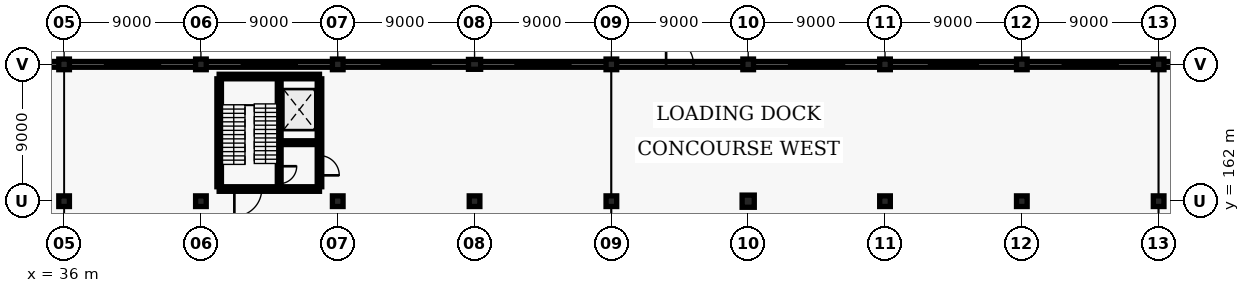
"""IFC4 building model, lengths in metres.
Left out: names, types, materials, properties, quantities, classifications, styles, units other than length and angle.
Written with IfcOpenShell. Run it as: python <this file> out.ifc"""

import sys

from ifc_helpers import new_model, si_unit, direction, frame, frame_2d, origin, origin_2d, place, context, subcontext, project, spatial, rectangle, circle, extrude, element, fill, save


model = new_model("IFC4")
c1 = context("Model", 3, precision=1e-05, world=origin(), true_north=direction((0.0, 1.0)))
c2 = subcontext(c1, "Body", "Model", "MODEL_VIEW")
j1 = project(units=[si_unit("LENGTHUNIT", "METRE"), si_unit("PLANEANGLEUNIT", "RADIAN")], contexts=[c1])
p1 = place(None, origin())
s1 = spatial("IfcSite", under=j1, at=p1, CompositionType="ELEMENT")
p2 = place(p1, origin())
s2 = spatial("IfcBuilding", under=s1, at=p2, CompositionType="ELEMENT")
p3 = place(p2, origin())
s3 = spatial("IfcBuildingStorey", under=s2, at=p3, CompositionType="ELEMENT", Elevation=0.0)
for number, where, z_axis, x_axis in (
    (1, (36.0, 162.0, 0.0), (0.0, 0.0, 1.0), (1.0, 0.0, 0.0)),
    (2, (36.0, 171.0, 0.0), (0.0, 0.0, 1.0), (1.0, 0.0, 0.0)),
    (3, (45.0, 162.0, 0.0), (0.0, 0.0, 1.0), (1.0, 0.0, 0.0)),
    (4, (45.0, 171.0, 0.0), (0.0, 0.0, 1.0), (1.0, 0.0, 0.0)),
    (5, (54.0, 162.0, 0.0), (0.0, 0.0, 1.0), (1.0, 0.0, 0.0)),
    (6, (54.0, 171.0, 0.0), (0.0, 0.0, 1.0), (1.0, 0.0, 0.0)),
    (7, (63.0, 162.0, 0.0), (0.0, 0.0, 1.0), (1.0, 0.0, 0.0)),
):
    element("IfcColumn", number, at=place(p3, frame(where, z_axis=z_axis, x_axis=x_axis)), inside=s3, PredefinedType="COLUMN", context=c2, shape_type="SweptSolid", body=[
        extrude(rectangle(XDim=0.7, YDim=0.7, at=origin_2d()), origin(), (0.0, 0.0, 1.0), 5.4),
    ])
p4 = place(p3, frame((63.0, 171.0, 0.0), z_axis=(0.0, 0.0, 1.0), x_axis=(1.0, 0.0, 0.0)))
e8 = element("IfcColumn", 8, at=p4, inside=s3, PredefinedType="COLUMN", context=c2, shape_type="SweptSolid", body=[
    extrude(rectangle(XDim=0.8, YDim=0.65, at=origin_2d()), origin(), (0.0, 0.0, 1.0), 5.4),
])
for number, where, z_axis, x_axis in (
    (9, (72.0, 162.0, 0.0), (0.0, 0.0, 1.0), (1.0, 0.0, 0.0)),
    (10, (72.0, 171.0, 0.0), (0.0, 0.0, 1.0), (1.0, 0.0, 0.0)),
):
    element("IfcColumn", number, at=place(p3, frame(where, z_axis=z_axis, x_axis=x_axis)), inside=s3, PredefinedType="COLUMN", context=c2, shape_type="SweptSolid", body=[
        extrude(rectangle(XDim=0.7, YDim=0.7, at=origin_2d()), origin(), (0.0, 0.0, 1.0), 5.4),
    ])
p5 = place(p3, frame((81.0, 162.0, 0.0), z_axis=(0.0, 0.0, 1.0), x_axis=(1.0, 0.0, 0.0)))
e11 = element("IfcColumn", 11, at=p5, inside=s3, PredefinedType="COLUMN", context=c2, shape_type="SweptSolid", body=[
    extrude(circle(Radius=0.4, at=origin_2d()), origin(), (0.0, 0.0, 1.0), 5.4),
])
for number, where, z_axis, x_axis in (
    (12, (81.0, 171.0, 0.0), (0.0, 0.0, 1.0), (1.0, 0.0, 0.0)),
    (13, (90.0, 162.0, 0.0), (0.0, 0.0, 1.0), (1.0, 0.0, 0.0)),
    (14, (90.0, 171.0, 0.0), (0.0, 0.0, 1.0), (1.0, 0.0, 0.0)),
    (15, (99.0, 162.0, 0.0), (0.0, 0.0, 1.0), (1.0, 0.0, 0.0)),
    (16, (99.0, 171.0, 0.0), (0.0, 0.0, 1.0), (1.0, 0.0, 0.0)),
    (17, (108.0, 162.0, 0.0), (0.0, 0.0, 1.0), (1.0, 0.0, 0.0)),
    (18, (108.0, 171.0, 0.0), (0.0, 0.0, 1.0), (1.0, 0.0, 0.0)),
):
    element("IfcColumn", number, at=place(p3, frame(where, z_axis=z_axis, x_axis=x_axis)), inside=s3, PredefinedType="COLUMN", context=c2, shape_type="SweptSolid", body=[
        extrude(rectangle(XDim=0.7, YDim=0.7, at=origin_2d()), origin(), (0.0, 0.0, 1.0), 5.4),
    ])
p6 = place(p3, frame((27.06, 171.0, 0.0), z_axis=(0.0, 0.0, 1.0), x_axis=(1.0, 0.0, 0.0)))
e19 = element("IfcWall", 19, at=p6, inside=s3, PredefinedType="SOLIDWALL", context=c2, shape_type="SweptSolid", body=[
    extrude(rectangle(XDim=8.88, YDim=0.38, at=frame_2d((4.44, 0.0))), origin(), (0.0, 0.0, 1.0), 4.55),
])
p7 = place(p3, frame((36.06, 171.0, 0.0), z_axis=(0.0, 0.0, 1.0), x_axis=(1.0, 0.0, 0.0)))
e20 = element("IfcWall", 20, at=p7, inside=s3, PredefinedType="SOLIDWALL", context=c2, shape_type="SweptSolid", body=[
    extrude(rectangle(XDim=8.88, YDim=0.38, at=frame_2d((4.44, 0.0))), origin(), (0.0, 0.0, 1.0), 4.55),
])
p8 = place(p7, frame((2.64, 0.0, 0.0)))
e21 = element("IfcOpeningElement", 21, at=p8, cuts=e20, PredefinedType="OPENING", context=c2, shape_type="SweptSolid", body=[
    extrude(rectangle(XDim=3.6, YDim=4.0, at=frame_2d((1.8, 2.0))), frame((0.0, 0.2, 0.0), z_axis=(0.0, -1.0, 0.0), x_axis=(1.0, 0.0, 0.0)), (0.0, 0.0, 1.0), 0.4),
])
p9 = place(p3, frame((45.06, 171.0, 0.0), z_axis=(0.0, 0.0, 1.0), x_axis=(1.0, 0.0, 0.0)))
e22 = element("IfcWall", 22, at=p9, inside=s3, PredefinedType="SOLIDWALL", context=c2, shape_type="SweptSolid", body=[
    extrude(rectangle(XDim=8.88, YDim=0.38, at=frame_2d((4.44, 0.0))), origin(), (0.0, 0.0, 1.0), 4.55),
])
p10 = place(p9, frame((2.64, 0.0, 0.0)))
e23 = element("IfcOpeningElement", 23, at=p10, cuts=e22, PredefinedType="OPENING", context=c2, shape_type="SweptSolid", body=[
    extrude(rectangle(XDim=3.6, YDim=4.0, at=frame_2d((1.8, 2.0))), frame((0.0, 0.2, 0.0), z_axis=(0.0, -1.0, 0.0), x_axis=(1.0, 0.0, 0.0)), (0.0, 0.0, 1.0), 0.4),
])
p11 = place(p3, frame((54.06, 171.0, 0.0), z_axis=(0.0, 0.0, 1.0), x_axis=(1.0, 0.0, 0.0)))
e24 = element("IfcWall", 24, at=p11, inside=s3, PredefinedType="SOLIDWALL", context=c2, shape_type="SweptSolid", body=[
    extrude(rectangle(XDim=8.88, YDim=0.38, at=frame_2d((4.44, 0.0))), origin(), (0.0, 0.0, 1.0), 4.55),
])
p12 = place(p11, frame((2.84, 0.0, 0.0)))
e25 = element("IfcOpeningElement", 25, at=p12, cuts=e24, PredefinedType="OPENING", context=c2, shape_type="SweptSolid", body=[
    extrude(rectangle(XDim=3.2, YDim=3.6, at=frame_2d((1.6, 1.8))), frame((0.0, 0.2, 0.0), z_axis=(0.0, -1.0, 0.0), x_axis=(1.0, 0.0, 0.0)), (0.0, 0.0, 1.0), 0.4),
])
p13 = place(p3, frame((63.06, 171.0, 0.0), z_axis=(0.0, 0.0, 1.0), x_axis=(1.0, 0.0, 0.0)))
e26 = element("IfcWall", 26, at=p13, inside=s3, PredefinedType="SOLIDWALL", context=c2, shape_type="SweptSolid", body=[
    extrude(rectangle(XDim=8.88, YDim=0.38, at=frame_2d((4.44, 0.0))), origin(), (0.0, 0.0, 1.0), 4.55),
])
p14 = place(p13, frame((2.64, 0.0, 0.0)))
e27 = element("IfcOpeningElement", 27, at=p14, cuts=e26, PredefinedType="OPENING", context=c2, shape_type="SweptSolid", body=[
    extrude(rectangle(XDim=3.6, YDim=4.0, at=frame_2d((1.8, 2.0))), frame((0.0, 0.2, 0.0), z_axis=(0.0, -1.0, 0.0), x_axis=(1.0, 0.0, 0.0)), (0.0, 0.0, 1.0), 0.4),
])
p15 = place(p3, frame((72.06, 171.0, 0.0), z_axis=(0.0, 0.0, 1.0), x_axis=(1.0, 0.0, 0.0)))
e28 = element("IfcWall", 28, at=p15, inside=s3, PredefinedType="SOLIDWALL", context=c2, shape_type="SweptSolid", body=[
    extrude(rectangle(XDim=8.88, YDim=0.38, at=frame_2d((4.44, 0.0))), origin(), (0.0, 0.0, 1.0), 4.55),
])
p16 = place(p15, frame((3.54, 0.0, 0.0)))
e29 = element("IfcOpeningElement", 29, at=p16, cuts=e28, PredefinedType="OPENING", context=c2, shape_type="SweptSolid", body=[
    extrude(rectangle(XDim=1.8, YDim=2.15, at=frame_2d((0.9, 1.075))), frame((0.0, 0.2, 0.0), z_axis=(0.0, -1.0, 0.0), x_axis=(1.0, 0.0, 0.0)), (0.0, 0.0, 1.0), 0.4),
])
p17 = place(p3, frame((81.06, 171.0, 0.0), z_axis=(0.0, 0.0, 1.0), x_axis=(1.0, 0.0, 0.0)))
e30 = element("IfcWall", 30, at=p17, inside=s3, PredefinedType="SOLIDWALL", context=c2, shape_type="SweptSolid", body=[
    extrude(rectangle(XDim=8.88, YDim=0.38, at=frame_2d((4.44, 0.0))), origin(), (0.0, 0.0, 1.0), 4.55),
])
p18 = place(p17, frame((2.64, 0.0, 0.0)))
e31 = element("IfcOpeningElement", 31, at=p18, cuts=e30, PredefinedType="OPENING", context=c2, shape_type="SweptSolid", body=[
    extrude(rectangle(XDim=3.6, YDim=4.0, at=frame_2d((1.8, 2.0))), frame((0.0, 0.2, 0.0), z_axis=(0.0, -1.0, 0.0), x_axis=(1.0, 0.0, 0.0)), (0.0, 0.0, 1.0), 0.4),
])
p19 = place(p3, frame((90.06, 171.0, 0.0), z_axis=(0.0, 0.0, 1.0), x_axis=(1.0, 0.0, 0.0)))
e32 = element("IfcWall", 32, at=p19, inside=s3, PredefinedType="SOLIDWALL", context=c2, shape_type="SweptSolid", body=[
    extrude(rectangle(XDim=8.88, YDim=0.38, at=frame_2d((4.44, 0.0))), origin(), (0.0, 0.0, 1.0), 4.55),
])
p20 = place(p19, frame((2.84, 0.0, 0.0)))
e33 = element("IfcOpeningElement", 33, at=p20, cuts=e32, PredefinedType="OPENING", context=c2, shape_type="SweptSolid", body=[
    extrude(rectangle(XDim=3.2, YDim=3.6, at=frame_2d((1.6, 1.8))), frame((0.0, 0.2, 0.0), z_axis=(0.0, -1.0, 0.0), x_axis=(1.0, 0.0, 0.0)), (0.0, 0.0, 1.0), 0.4),
])
p21 = place(p3, frame((99.06, 171.0, 0.0), z_axis=(0.0, 0.0, 1.0), x_axis=(1.0, 0.0, 0.0)))
e34 = element("IfcWall", 34, at=p21, inside=s3, PredefinedType="SOLIDWALL", context=c2, shape_type="SweptSolid", body=[
    extrude(rectangle(XDim=8.88, YDim=0.38, at=frame_2d((4.44, 0.0))), origin(), (0.0, 0.0, 1.0), 4.55),
])
p22 = place(p21, frame((2.64, 0.0, 0.0)))
e35 = element("IfcOpeningElement", 35, at=p22, cuts=e34, PredefinedType="OPENING", context=c2, shape_type="SweptSolid", body=[
    extrude(rectangle(XDim=3.6, YDim=4.0, at=frame_2d((1.8, 2.0))), frame((0.0, 0.2, 0.0), z_axis=(0.0, -1.0, 0.0), x_axis=(1.0, 0.0, 0.0)), (0.0, 0.0, 1.0), 0.4),
])
p23 = place(p3, frame((108.06, 171.0, 0.0), z_axis=(0.0, 0.0, 1.0), x_axis=(1.0, 0.0, 0.0)))
e36 = element("IfcWall", 36, at=p23, inside=s3, PredefinedType="SOLIDWALL", context=c2, shape_type="SweptSolid", body=[
    extrude(rectangle(XDim=8.88, YDim=0.38, at=frame_2d((4.44, 0.0))), origin(), (0.0, 0.0, 1.0), 4.55),
])
p24 = place(p23, frame((2.64, 0.0, 0.0)))
e37 = element("IfcOpeningElement", 37, at=p24, cuts=e36, PredefinedType="OPENING", context=c2, shape_type="SweptSolid", body=[
    extrude(rectangle(XDim=3.6, YDim=4.0, at=frame_2d((1.8, 2.0))), frame((0.0, 0.2, 0.0), z_axis=(0.0, -1.0, 0.0), x_axis=(1.0, 0.0, 0.0)), (0.0, 0.0, 1.0), 0.4),
])
p25 = place(p3, frame((46.2, 162.8, 0.0), z_axis=(0.0, 0.0, 1.0), x_axis=(1.0, 0.0, 0.0)))
e38 = element("IfcWall", 38, at=p25, inside=s3, PredefinedType="SHEAR", context=c2, shape_type="SweptSolid", body=[
    extrude(rectangle(XDim=6.6, YDim=0.3, at=frame_2d((3.3, 0.0))), origin(), (0.0, 0.0, 1.0), 5.4),
])
p26 = place(p25, frame((1.0, 0.0, 0.0)))
e39 = element("IfcOpeningElement", 39, at=p26, cuts=e38, PredefinedType="OPENING", context=c2, shape_type="SweptSolid", body=[
    extrude(rectangle(XDim=1.8, YDim=2.15, at=frame_2d((0.9, 1.075))), frame((0.0, 0.16, 0.0), z_axis=(0.0, -1.0, 0.0), x_axis=(1.0, 0.0, 0.0)), (0.0, 0.0, 1.0), 0.32),
])
p27 = place(p3, frame((46.2, 170.2, 0.0), z_axis=(0.0, 0.0, 1.0), x_axis=(1.0, 0.0, 0.0)))
e40 = element("IfcWall", 40, at=p27, inside=s3, PredefinedType="SHEAR", context=c2, shape_type="SweptSolid", body=[
    extrude(rectangle(XDim=6.6, YDim=0.3, at=frame_2d((3.3, 0.0))), origin(), (0.0, 0.0, 1.0), 5.4),
])
p28 = place(p3, frame((46.2, 162.95, 0.0), z_axis=(0.0, 0.0, 1.0), x_axis=(0.0, 1.0, 0.0)))
e41 = element("IfcWall", 41, at=p28, inside=s3, PredefinedType="SHEAR", context=c2, shape_type="SweptSolid", body=[
    extrude(rectangle(XDim=7.1, YDim=0.3, at=frame_2d((3.55, 0.0))), origin(), (0.0, 0.0, 1.0), 5.4),
])
p29 = place(p3, frame((52.8, 162.95, 0.0), z_axis=(0.0, 0.0, 1.0), x_axis=(0.0, 1.0, 0.0)))
e42 = element("IfcWall", 42, at=p29, inside=s3, PredefinedType="SHEAR", context=c2, shape_type="SweptSolid", body=[
    extrude(rectangle(XDim=7.1, YDim=0.3, at=frame_2d((3.55, 0.0))), origin(), (0.0, 0.0, 1.0), 5.4),
])
p30 = place(p29, frame((0.75, 0.0, 0.0)))
e43 = element("IfcOpeningElement", 43, at=p30, cuts=e42, PredefinedType="OPENING", context=c2, shape_type="SweptSolid", body=[
    extrude(rectangle(XDim=1.3, YDim=2.15, at=frame_2d((0.65, 1.075))), frame((0.0, 0.16, 0.0), z_axis=(0.0, -1.0, 0.0), x_axis=(1.0, 0.0, 0.0)), (0.0, 0.0, 1.0), 0.32),
])
p31 = place(p3, frame((50.15, 162.95, 0.0), z_axis=(0.0, 0.0, 1.0), x_axis=(0.0, 1.0, 0.0)))
e44 = element("IfcWall", 44, at=p31, inside=s3, PredefinedType="SHEAR", context=c2, shape_type="SweptSolid", body=[
    extrude(rectangle(XDim=7.1, YDim=0.25, at=frame_2d((3.55, 0.0))), origin(), (0.0, 0.0, 1.0), 5.4),
])
p32 = place(p31, frame((0.2, 0.0, 0.0)))
e45 = element("IfcOpeningElement", 45, at=p32, cuts=e44, PredefinedType="OPENING", context=c2, shape_type="SweptSolid", body=[
    extrude(rectangle(XDim=1.15, YDim=2.15, at=frame_2d((0.575, 1.075))), frame((0.0, 0.135, 0.0), z_axis=(0.0, -1.0, 0.0), x_axis=(1.0, 0.0, 0.0)), (0.0, 0.0, 1.0), 0.27),
])
p33 = place(p3, frame((50.27, 165.85, 0.0), z_axis=(0.0, 0.0, 1.0), x_axis=(1.0, 0.0, 0.0)))
e46 = element("IfcWall", 46, at=p33, inside=s3, PredefinedType="SHEAR", context=c2, shape_type="SweptSolid", body=[
    extrude(rectangle(XDim=2.38, YDim=0.25, at=frame_2d((1.19, 0.0))), origin(), (0.0, 0.0, 1.0), 5.4),
])
p34 = place(p33, frame((0.39, 0.0, 0.0)))
e47 = element("IfcOpeningElement", 47, at=p34, cuts=e46, PredefinedType="OPENING", context=c2, shape_type="SweptSolid", body=[
    extrude(rectangle(XDim=1.6, YDim=2.3, at=frame_2d((0.8, 1.15))), frame((0.0, 0.135, 0.0), z_axis=(0.0, -1.0, 0.0), x_axis=(1.0, 0.0, 0.0)), (0.0, 0.0, 1.0), 0.27),
])
p35 = place(p8, origin())
e48 = element("IfcDoor", 48, at=p35, inside=s3, OperationType="ROLLINGUP", PredefinedType="GATE", context=c2, shape_type="SweptSolid", body=[
    extrude(rectangle(XDim=3.6, YDim=4.0, at=frame_2d((1.8, 2.0))), frame((0.0, 0.025, 0.0), z_axis=(0.0, -1.0, 0.0), x_axis=(1.0, 0.0, 0.0)), (0.0, 0.0, 1.0), 0.05),
])
fill(e21, e48)
p36 = place(p10, origin())
e49 = element("IfcDoor", 49, at=p36, inside=s3, OperationType="ROLLINGUP", PredefinedType="GATE", context=c2, shape_type="SweptSolid", body=[
    extrude(rectangle(XDim=3.6, YDim=4.0, at=frame_2d((1.8, 2.0))), frame((0.0, 0.025, 0.0), z_axis=(0.0, -1.0, 0.0), x_axis=(1.0, 0.0, 0.0)), (0.0, 0.0, 1.0), 0.05),
])
fill(e23, e49)
p37 = place(p12, origin())
e50 = element("IfcDoor", 50, at=p37, inside=s3, OperationType="ROLLINGUP", PredefinedType="GATE", context=c2, shape_type="SweptSolid", body=[
    extrude(rectangle(XDim=3.2, YDim=3.6, at=frame_2d((1.6, 1.8))), frame((0.0, 0.025, 0.0), z_axis=(0.0, -1.0, 0.0), x_axis=(1.0, 0.0, 0.0)), (0.0, 0.0, 1.0), 0.05),
])
fill(e25, e50)
p38 = place(p14, origin())
e51 = element("IfcDoor", 51, at=p38, inside=s3, OperationType="ROLLINGUP", PredefinedType="GATE", context=c2, shape_type="SweptSolid", body=[
    extrude(rectangle(XDim=3.6, YDim=4.0, at=frame_2d((1.8, 2.0))), frame((0.0, 0.025, 0.0), z_axis=(0.0, -1.0, 0.0), x_axis=(1.0, 0.0, 0.0)), (0.0, 0.0, 1.0), 0.05),
])
fill(e27, e51)
p39 = place(p16, origin())
e52 = element("IfcDoor", 52, at=p39, inside=s3, OperationType="DOUBLE_DOOR_SINGLE_SWING", PredefinedType="DOOR", context=c2, shape_type="SweptSolid", body=[
    extrude(rectangle(XDim=1.8, YDim=2.15, at=frame_2d((0.9, 1.075))), frame((0.0, 0.025, 0.0), z_axis=(0.0, -1.0, 0.0), x_axis=(1.0, 0.0, 0.0)), (0.0, 0.0, 1.0), 0.05),
])
fill(e29, e52)
p40 = place(p18, origin())
e53 = element("IfcDoor", 53, at=p40, inside=s3, OperationType="ROLLINGUP", PredefinedType="GATE", context=c2, shape_type="SweptSolid", body=[
    extrude(rectangle(XDim=3.6, YDim=4.0, at=frame_2d((1.8, 2.0))), frame((0.0, 0.025, 0.0), z_axis=(0.0, -1.0, 0.0), x_axis=(1.0, 0.0, 0.0)), (0.0, 0.0, 1.0), 0.05),
])
fill(e31, e53)
p41 = place(p20, origin())
e54 = element("IfcDoor", 54, at=p41, inside=s3, OperationType="ROLLINGUP", PredefinedType="GATE", context=c2, shape_type="SweptSolid", body=[
    extrude(rectangle(XDim=3.2, YDim=3.6, at=frame_2d((1.6, 1.8))), frame((0.0, 0.025, 0.0), z_axis=(0.0, -1.0, 0.0), x_axis=(1.0, 0.0, 0.0)), (0.0, 0.0, 1.0), 0.05),
])
fill(e33, e54)
p42 = place(p22, origin())
e55 = element("IfcDoor", 55, at=p42, inside=s3, OperationType="ROLLINGUP", PredefinedType="GATE", context=c2, shape_type="SweptSolid", body=[
    extrude(rectangle(XDim=3.6, YDim=4.0, at=frame_2d((1.8, 2.0))), frame((0.0, 0.025, 0.0), z_axis=(0.0, -1.0, 0.0), x_axis=(1.0, 0.0, 0.0)), (0.0, 0.0, 1.0), 0.05),
])
fill(e35, e55)
p43 = place(p30, frame((1.3, 0.0, 0.0), z_axis=(0.0, 0.0, 1.0), x_axis=(-1.0, 0.0, 0.0)))
e56 = element("IfcDoor", 56, at=p43, inside=s3, OperationType="DOUBLE_DOOR_SINGLE_SWING", PredefinedType="DOOR", context=c2, shape_type="SweptSolid", body=[
    extrude(rectangle(XDim=1.3, YDim=2.15, at=frame_2d((0.65, 1.075))), frame((0.0, 0.025, 0.0), z_axis=(0.0, -1.0, 0.0), x_axis=(1.0, 0.0, 0.0)), (0.0, 0.0, 1.0), 0.05),
])
fill(e43, e56)
p44 = place(p32, origin())
e57 = element("IfcDoor", 57, at=p44, inside=s3, OperationType="SINGLE_SWING_RIGHT", PredefinedType="DOOR", context=c2, shape_type="SweptSolid", body=[
    extrude(rectangle(XDim=1.15, YDim=2.15, at=frame_2d((0.575, 1.075))), frame((0.0, 0.025, 0.0), z_axis=(0.0, -1.0, 0.0), x_axis=(1.0, 0.0, 0.0)), (0.0, 0.0, 1.0), 0.05),
])
fill(e45, e57)
p45 = place(p26, frame((1.8, 0.0, 0.0), z_axis=(0.0, 0.0, 1.0), x_axis=(-1.0, 0.0, 0.0)))
e58 = element("IfcDoor", 58, at=p45, inside=s3, OperationType="DOUBLE_DOOR_SINGLE_SWING", PredefinedType="DOOR", context=c2, shape_type="SweptSolid", body=[
    extrude(rectangle(XDim=1.8, YDim=2.15, at=frame_2d((0.9, 1.075))), frame((0.0, 0.025, 0.0), z_axis=(0.0, -1.0, 0.0), x_axis=(1.0, 0.0, 0.0)), (0.0, 0.0, 1.0), 0.05),
])
fill(e39, e58)
p46 = place(p34, origin())
e59 = element("IfcDoor", 59, at=p46, inside=s3, OperationType="SLIDING_TO_LEFT", PredefinedType="DOOR", context=c2, shape_type="SweptSolid", body=[
    extrude(rectangle(XDim=1.6, YDim=2.3, at=frame_2d((0.8, 1.15))), frame((0.0, 0.025, 0.0), z_axis=(0.0, -1.0, 0.0), x_axis=(1.0, 0.0, 0.0)), (0.0, 0.0, 1.0), 0.05),
])
fill(e47, e59)
save(model, sys.argv[1])
